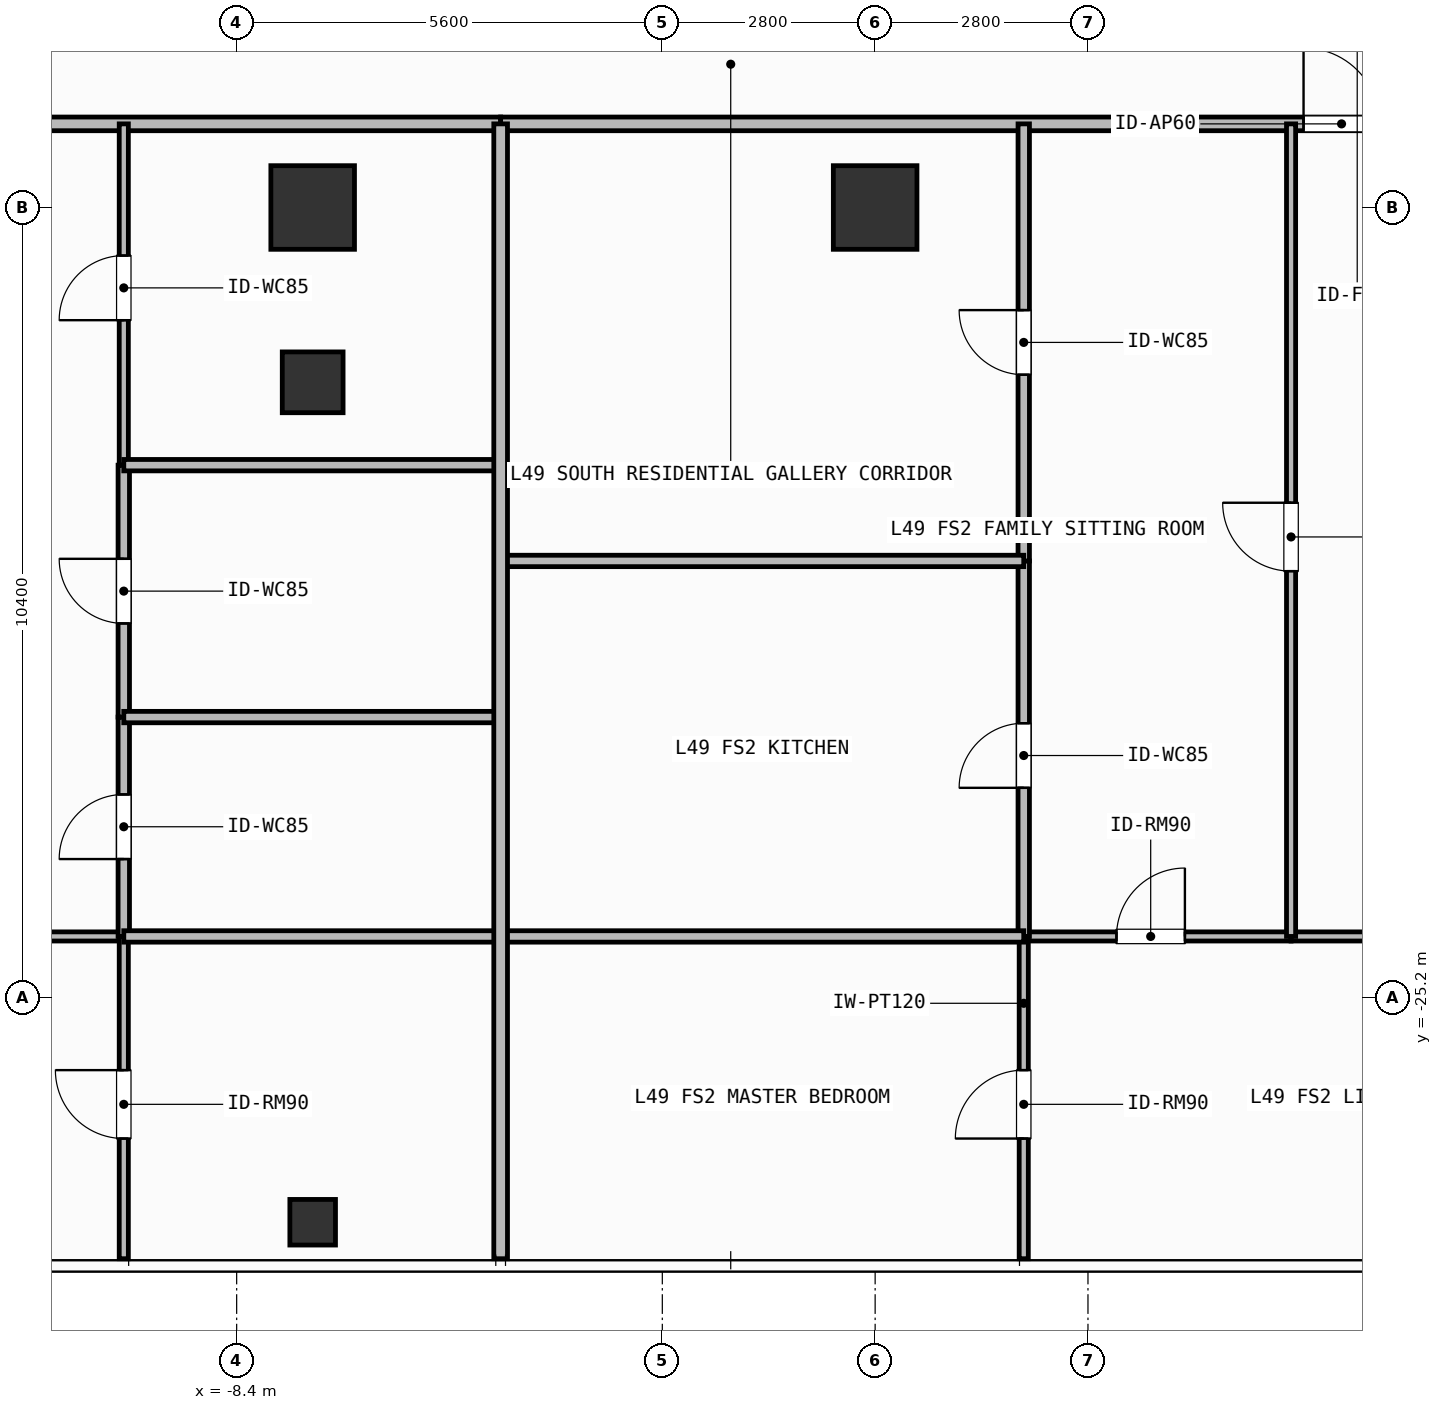
"""IFC4 building model, lengths in metres.
Left out: names, types, materials, properties, quantities, classifications, styles, units other than length and angle.
Written with IfcOpenShell. Run it as: python <this file> out.ifc"""

import sys

from ifc_helpers import new_model, si_unit, direction, frame, frame_2d, origin, origin_2d, place, context, subcontext, project, spatial, rectangle, hollow_rectangle, extrude, element, fill, save


model = new_model("IFC4")
c1 = context("Model", 3, precision=1e-05, world=origin(), true_north=direction((0.0, 1.0)))
c2 = subcontext(c1, "Body", "Model", "MODEL_VIEW")
j1 = project(units=[si_unit("LENGTHUNIT", "METRE"), si_unit("PLANEANGLEUNIT", "RADIAN")], contexts=[c1])
p1 = place(None, origin())
s1 = spatial("IfcSite", under=j1, at=p1, CompositionType="ELEMENT")
p2 = place(p1, origin())
s2 = spatial("IfcBuilding", under=s1, at=p2, CompositionType="ELEMENT")
p3 = place(p2, frame((0.0, 0.0, 199.2)))
s3 = spatial("IfcBuildingStorey", under=s2, at=p3, CompositionType="ELEMENT", Elevation=199.2)
for number, where, z_axis, x_axis in (
    (1, (-7.4, -14.8, 0.0), (0.0, 0.0, 1.0), (1.0, 0.0, 0.0)),
    (2, (0.0, -14.8, 0.0), (0.0, 0.0, 1.0), (1.0, 0.0, 0.0)),
):
    element("IfcColumn", number, at=place(p3, frame(where, z_axis=z_axis, x_axis=x_axis)), inside=s3, PredefinedType="COLUMN", context=c2, shape_type="SweptSolid", body=[
        extrude(rectangle(XDim=1.1, YDim=1.1, at=origin_2d()), origin(), (0.0, 0.0, 1.0), 3.9),
    ])
p4 = place(p3, frame((-7.4, -17.1, 0.0), z_axis=(0.0, 0.0, 1.0), x_axis=(1.0, 0.0, 0.0)))
e3 = element("IfcColumn", 3, at=p4, inside=s3, PredefinedType="COLUMN", context=c2, shape_type="SweptSolid", body=[
    extrude(hollow_rectangle(XDim=0.8, YDim=0.8, WallThickness=0.036, at=origin_2d()), origin(), (0.0, 0.0, 1.0), 3.9),
])
p5 = place(p3, frame((-7.4, -28.15, 0.0), z_axis=(0.0, 0.0, 1.0), x_axis=(1.0, 0.0, 0.0)))
e4 = element("IfcColumn", 4, at=p5, inside=s3, PredefinedType="COLUMN", context=c2, shape_type="SweptSolid", body=[
    extrude(hollow_rectangle(XDim=0.6, YDim=0.6, WallThickness=0.028, at=origin_2d()), origin(), (0.0, 0.0, 1.0), 3.9),
])
p6 = place(p3, frame((-20.82, -13.7, 0.0), z_axis=(0.0, 0.0, 1.0), x_axis=(1.0, 0.0, 0.0)))
e5 = element("IfcWall", 5, at=p6, inside=s3, PredefinedType="PARTITIONING", context=c2, shape_type="SweptSolid", body=[
    extrude(rectangle(XDim=15.893, YDim=0.18, at=frame_2d((7.947, 0.0))), origin(), (0.0, 0.0, 1.0), 3.68),
])
p7 = place(p6, frame((6.997, 0.0, 0.0)))
e6 = element("IfcOpeningElement", 6, at=p7, cuts=e5, PredefinedType="OPENING", context=c2, shape_type="SweptSolid", body=[
    extrude(rectangle(XDim=1.0, YDim=2.2, at=frame_2d((0.5, 1.1))), frame((0.0, 0.1, 0.0), z_axis=(0.0, -1.0, 0.0), x_axis=(1.0, 0.0, 0.0)), (0.0, 0.0, 1.0), 0.2),
])
p8 = place(p3, frame((-16.774, -24.39, 0.0), z_axis=(0.0, 0.0, 1.0), x_axis=(1.0, 0.0, 0.0)))
e7 = element("IfcWall", 7, at=p8, inside=s3, PredefinedType="PARTITIONING", context=c2, shape_type="SweptSolid", body=[
    extrude(rectangle(XDim=6.889, YDim=0.12, at=frame_2d((3.444, 0.0))), origin(), (0.0, 0.0, 1.0), 3.68),
])
p9 = place(p8, frame((2.994, 0.0, 0.0)))
e8 = element("IfcOpeningElement", 8, at=p9, cuts=e7, PredefinedType="OPENING", context=c2, shape_type="SweptSolid", body=[
    extrude(rectangle(XDim=0.9, YDim=2.1, at=frame_2d((0.45, 1.05))), frame((0.0, 0.07, 0.0), z_axis=(0.0, -1.0, 0.0), x_axis=(1.0, 0.0, 0.0)), (0.0, 0.0, 1.0), 0.14),
])
p10 = place(p3, frame((-9.885, -24.39, 0.0), z_axis=(0.0, 0.0, 1.0), x_axis=(0.0, 1.0, 0.0)))
e9 = element("IfcWall", 9, at=p10, inside=s3, PredefinedType="PARTITIONING", context=c2, shape_type="SweptSolid", body=[
    extrude(rectangle(XDim=2.886, YDim=0.15, at=frame_2d((1.443, 0.0))), origin(), (0.0, 0.0, 1.0), 3.68),
])
p11 = place(p10, frame((1.018, 0.0, 0.0)))
e10 = element("IfcOpeningElement", 10, at=p11, cuts=e9, PredefinedType="OPENING", context=c2, shape_type="SweptSolid", body=[
    extrude(rectangle(XDim=0.85, YDim=2.1, at=frame_2d((0.425, 1.05))), frame((0.0, 0.085, 0.0), z_axis=(0.0, -1.0, 0.0), x_axis=(1.0, 0.0, 0.0)), (0.0, 0.0, 1.0), 0.17),
])
p12 = place(p3, frame((-9.885, -21.504, 0.0), z_axis=(0.0, 0.0, 1.0), x_axis=(0.0, 1.0, 0.0)))
e11 = element("IfcWall", 11, at=p12, inside=s3, PredefinedType="PARTITIONING", context=c2, shape_type="SweptSolid", body=[
    extrude(rectangle(XDim=3.314, YDim=0.15, at=frame_2d((1.657, 0.0))), origin(), (0.0, 0.0, 1.0), 3.68),
])
p13 = place(p12, frame((1.232, 0.0, 0.0)))
e12 = element("IfcOpeningElement", 12, at=p13, cuts=e11, PredefinedType="OPENING", context=c2, shape_type="SweptSolid", body=[
    extrude(rectangle(XDim=0.85, YDim=2.1, at=frame_2d((0.425, 1.05))), frame((0.0, 0.085, 0.0), z_axis=(0.0, -1.0, 0.0), x_axis=(1.0, 0.0, 0.0)), (0.0, 0.0, 1.0), 0.17),
])
p14 = place(p3, frame((-9.885, -18.19, 0.0), z_axis=(0.0, 0.0, 1.0), x_axis=(0.0, 1.0, 0.0)))
e13 = element("IfcWall", 13, at=p14, inside=s3, PredefinedType="PARTITIONING", context=c2, shape_type="SweptSolid", body=[
    extrude(rectangle(XDim=4.49, YDim=0.12, at=frame_2d((2.245, 0.0))), origin(), (0.0, 0.0, 1.0), 3.68),
])
p15 = place(p14, frame((1.907, 0.0, 0.0)))
e14 = element("IfcOpeningElement", 14, at=p15, cuts=e13, PredefinedType="OPENING", context=c2, shape_type="SweptSolid", body=[
    extrude(rectangle(XDim=0.85, YDim=2.1, at=frame_2d((0.425, 1.05))), frame((0.0, 0.07, 0.0), z_axis=(0.0, -1.0, 0.0), x_axis=(1.0, 0.0, 0.0)), (0.0, 0.0, 1.0), 0.14),
])
p16 = place(p3, frame((-9.885, -28.63, 0.0), z_axis=(0.0, 0.0, 1.0), x_axis=(0.0, 1.0, 0.0)))
e15 = element("IfcWall", 15, at=p16, inside=s3, PredefinedType="PARTITIONING", context=c2, shape_type="SweptSolid", body=[
    extrude(rectangle(XDim=4.24, YDim=0.12, at=frame_2d((2.12, 0.0))), origin(), (0.0, 0.0, 1.0), 3.68),
])
p17 = place(p16, frame((1.581, 0.0, 0.0)))
e16 = element("IfcOpeningElement", 16, at=p17, cuts=e15, PredefinedType="OPENING", context=c2, shape_type="SweptSolid", body=[
    extrude(rectangle(XDim=0.9, YDim=2.1, at=frame_2d((0.45, 1.05))), frame((0.0, 0.07, 0.0), z_axis=(0.0, -1.0, 0.0), x_axis=(1.0, 0.0, 0.0)), (0.0, 0.0, 1.0), 0.14),
])
p18 = place(p3, frame((-4.927, -13.7, 0.0), z_axis=(0.0, 0.0, 1.0), x_axis=(1.0, 0.0, 0.0)))
e17 = element("IfcWall", 17, at=p18, inside=s3, PredefinedType="PARTITIONING", context=c2, shape_type="SweptSolid", body=[
    extrude(rectangle(XDim=21.947, YDim=0.18, at=frame_2d((10.974, 0.0))), origin(), (0.0, 0.0, 1.0), 3.68),
])
p19 = place(p18, frame((10.563, 0.0, 0.0)))
e18 = element("IfcOpeningElement", 18, at=p19, cuts=e17, PredefinedType="OPENING", context=c2, shape_type="SweptSolid", body=[
    extrude(rectangle(XDim=1.0, YDim=2.2, at=frame_2d((0.5, 1.1))), frame((0.0, 0.1, 0.0), z_axis=(0.0, -1.0, 0.0), x_axis=(1.0, 0.0, 0.0)), (0.0, 0.0, 1.0), 0.2),
])
p20 = place(p3, frame((1.955, -24.39, 0.0), z_axis=(0.0, 0.0, 1.0), x_axis=(1.0, 0.0, 0.0)))
e19 = element("IfcWall", 19, at=p20, inside=s3, PredefinedType="PARTITIONING", context=c2, shape_type="SweptSolid", body=[
    extrude(rectangle(XDim=3.517, YDim=0.12, at=frame_2d((1.758, 0.0))), origin(), (0.0, 0.0, 1.0), 3.68),
])
p21 = place(p20, frame((1.22, 0.0, 0.0)))
e20 = element("IfcOpeningElement", 20, at=p21, cuts=e19, PredefinedType="OPENING", context=c2, shape_type="SweptSolid", body=[
    extrude(rectangle(XDim=0.9, YDim=2.1, at=frame_2d((0.45, 1.05))), frame((0.0, 0.07, 0.0), z_axis=(0.0, -1.0, 0.0), x_axis=(1.0, 0.0, 0.0)), (0.0, 0.0, 1.0), 0.14),
])
p22 = place(p3, frame((5.472, -24.39, 0.0), z_axis=(0.0, 0.0, 1.0), x_axis=(1.0, 0.0, 0.0)))
e21 = element("IfcWall", 21, at=p22, inside=s3, PredefinedType="PARTITIONING", context=c2, shape_type="SweptSolid", body=[
    extrude(rectangle(XDim=5.342, YDim=0.12, at=frame_2d((2.671, 0.0))), origin(), (0.0, 0.0, 1.0), 3.68),
])
p23 = place(p22, frame((2.131, 0.0, 0.0)))
e22 = element("IfcOpeningElement", 22, at=p23, cuts=e21, PredefinedType="OPENING", context=c2, shape_type="SweptSolid", body=[
    extrude(rectangle(XDim=0.9, YDim=2.1, at=frame_2d((0.45, 1.05))), frame((0.0, 0.07, 0.0), z_axis=(0.0, -1.0, 0.0), x_axis=(1.0, 0.0, 0.0)), (0.0, 0.0, 1.0), 0.14),
])
p24 = place(p3, frame((5.472, -24.39, 0.0), z_axis=(0.0, 0.0, 1.0), x_axis=(0.0, 1.0, 0.0)))
e23 = element("IfcWall", 23, at=p24, inside=s3, PredefinedType="PARTITIONING", context=c2, shape_type="SweptSolid", body=[
    extrude(rectangle(XDim=10.69, YDim=0.12, at=frame_2d((5.345, 0.0))), origin(), (0.0, 0.0, 1.0), 3.68),
])
p25 = place(p24, frame((4.806, 0.0, 0.0)))
e24 = element("IfcOpeningElement", 24, at=p25, cuts=e23, PredefinedType="OPENING", context=c2, shape_type="SweptSolid", body=[
    extrude(rectangle(XDim=0.9, YDim=2.1, at=frame_2d((0.45, 1.05))), frame((0.0, 0.07, 0.0), z_axis=(0.0, -1.0, 0.0), x_axis=(1.0, 0.0, 0.0)), (0.0, 0.0, 1.0), 0.14),
])
p26 = place(p3, frame((1.955, -24.39, 0.0), z_axis=(0.0, 0.0, 1.0), x_axis=(0.0, 1.0, 0.0)))
e25 = element("IfcWall", 25, at=p26, inside=s3, PredefinedType="PARTITIONING", context=c2, shape_type="SweptSolid", body=[
    extrude(rectangle(XDim=4.94, YDim=0.15, at=frame_2d((2.47, 0.0))), origin(), (0.0, 0.0, 1.0), 3.68),
])
p27 = place(p26, frame((1.955, 0.0, 0.0)))
e26 = element("IfcOpeningElement", 26, at=p27, cuts=e25, PredefinedType="OPENING", context=c2, shape_type="SweptSolid", body=[
    extrude(rectangle(XDim=0.85, YDim=2.1, at=frame_2d((0.425, 1.05))), frame((0.0, 0.085, 0.0), z_axis=(0.0, -1.0, 0.0), x_axis=(1.0, 0.0, 0.0)), (0.0, 0.0, 1.0), 0.17),
])
p28 = place(p3, frame((1.955, -19.45, 0.0), z_axis=(0.0, 0.0, 1.0), x_axis=(0.0, 1.0, 0.0)))
e27 = element("IfcWall", 27, at=p28, inside=s3, PredefinedType="PARTITIONING", context=c2, shape_type="SweptSolid", body=[
    extrude(rectangle(XDim=5.75, YDim=0.15, at=frame_2d((2.875, 0.0))), origin(), (0.0, 0.0, 1.0), 3.68),
])
p29 = place(p28, frame((2.45, 0.0, 0.0)))
e28 = element("IfcOpeningElement", 28, at=p29, cuts=e27, PredefinedType="OPENING", context=c2, shape_type="SweptSolid", body=[
    extrude(rectangle(XDim=0.85, YDim=2.1, at=frame_2d((0.425, 1.05))), frame((0.0, 0.085, 0.0), z_axis=(0.0, -1.0, 0.0), x_axis=(1.0, 0.0, 0.0)), (0.0, 0.0, 1.0), 0.17),
])
p30 = place(p3, frame((1.955, -28.63, 0.0), z_axis=(0.0, 0.0, 1.0), x_axis=(0.0, 1.0, 0.0)))
e29 = element("IfcWall", 29, at=p30, inside=s3, PredefinedType="PARTITIONING", context=c2, shape_type="SweptSolid", body=[
    extrude(rectangle(XDim=4.24, YDim=0.12, at=frame_2d((2.12, 0.0))), origin(), (0.0, 0.0, 1.0), 3.68),
])
p31 = place(p30, frame((1.581, 0.0, 0.0)))
e30 = element("IfcOpeningElement", 30, at=p31, cuts=e29, PredefinedType="OPENING", context=c2, shape_type="SweptSolid", body=[
    extrude(rectangle(XDim=0.9, YDim=2.1, at=frame_2d((0.45, 1.05))), frame((0.0, 0.07, 0.0), z_axis=(0.0, -1.0, 0.0), x_axis=(1.0, 0.0, 0.0)), (0.0, 0.0, 1.0), 0.14),
])
for number, where, z_axis, x_axis in (
    (31, (-9.885, -21.504, 0.0), (0.0, 0.0, 1.0), (1.0, 0.0, 0.0)),
    (32, (-9.885, -18.19, 0.0), (0.0, 0.0, 1.0), (1.0, 0.0, 0.0)),
    (33, (-9.885, -24.39, 0.0), (0.0, 0.0, 1.0), (1.0, 0.0, 0.0)),
):
    element("IfcWall", number, at=place(p3, frame(where, z_axis=z_axis, x_axis=x_axis)), inside=s3, PredefinedType="PARTITIONING", context=c2, shape_type="SweptSolid", body=[
        extrude(rectangle(XDim=4.958, YDim=0.15, at=frame_2d((2.479, 0.0))), origin(), (0.0, 0.0, 1.0), 3.68),
    ])
for number, where, z_axis, x_axis in (
    (34, (-4.927, -19.45, 0.0), (0.0, 0.0, 1.0), (1.0, 0.0, 0.0)),
    (35, (-4.927, -24.39, 0.0), (0.0, 0.0, 1.0), (1.0, 0.0, 0.0)),
):
    element("IfcWall", number, at=place(p3, frame(where, z_axis=z_axis, x_axis=x_axis)), inside=s3, PredefinedType="PARTITIONING", context=c2, shape_type="SweptSolid", body=[
        extrude(rectangle(XDim=6.882, YDim=0.15, at=frame_2d((3.441, 0.0))), origin(), (0.0, 0.0, 1.0), 3.68),
    ])
p32 = place(p3, frame((-4.927, -28.63, 0.0), z_axis=(0.0, 0.0, 1.0), x_axis=(0.0, 1.0, 0.0)))
e36 = element("IfcWall", 36, at=p32, inside=s3, PredefinedType="PARTITIONING", context=c2, shape_type="SweptSolid", body=[
    extrude(rectangle(XDim=14.93, YDim=0.18, at=frame_2d((7.465, 0.0))), origin(), (0.0, 0.0, 1.0), 3.68),
])
p33 = place(p11, origin())
e37 = element("IfcDoor", 37, at=p33, inside=s3, OperationType="SINGLE_SWING_LEFT", PredefinedType="DOOR", context=c2, shape_type="SweptSolid", body=[
    extrude(rectangle(XDim=0.85, YDim=2.1, at=frame_2d((0.425, 1.05))), frame((0.0, 0.025, 0.0), z_axis=(0.0, -1.0, 0.0), x_axis=(1.0, 0.0, 0.0)), (0.0, 0.0, 1.0), 0.05),
])
fill(e10, e37)
p34 = place(p13, origin())
e38 = element("IfcDoor", 38, at=p34, inside=s3, OperationType="SINGLE_SWING_RIGHT", PredefinedType="DOOR", context=c2, shape_type="SweptSolid", body=[
    extrude(rectangle(XDim=0.85, YDim=2.1, at=frame_2d((0.425, 1.05))), frame((0.0, 0.025, 0.0), z_axis=(0.0, -1.0, 0.0), x_axis=(1.0, 0.0, 0.0)), (0.0, 0.0, 1.0), 0.05),
])
fill(e12, e38)
p35 = place(p15, origin())
e39 = element("IfcDoor", 39, at=p35, inside=s3, OperationType="SINGLE_SWING_LEFT", PredefinedType="DOOR", context=c2, shape_type="SweptSolid", body=[
    extrude(rectangle(XDim=0.85, YDim=2.1, at=frame_2d((0.425, 1.05))), frame((0.0, 0.025, 0.0), z_axis=(0.0, -1.0, 0.0), x_axis=(1.0, 0.0, 0.0)), (0.0, 0.0, 1.0), 0.05),
])
fill(e14, e39)
p36 = place(p17, origin())
e40 = element("IfcDoor", 40, at=p36, inside=s3, OperationType="SINGLE_SWING_RIGHT", PredefinedType="DOOR", context=c2, shape_type="SweptSolid", body=[
    extrude(rectangle(XDim=0.9, YDim=2.1, at=frame_2d((0.45, 1.05))), frame((0.0, 0.025, 0.0), z_axis=(0.0, -1.0, 0.0), x_axis=(1.0, 0.0, 0.0)), (0.0, 0.0, 1.0), 0.05),
])
fill(e16, e40)
p37 = place(p19, origin())
e41 = element("IfcDoor", 41, at=p37, inside=s3, OperationType="SINGLE_SWING_LEFT", PredefinedType="DOOR", context=c2, shape_type="SweptSolid", body=[
    extrude(rectangle(XDim=1.0, YDim=2.2, at=frame_2d((0.5, 1.1))), frame((0.0, 0.025, 0.0), z_axis=(0.0, -1.0, 0.0), x_axis=(1.0, 0.0, 0.0)), (0.0, 0.0, 1.0), 0.05),
])
fill(e18, e41)
p38 = place(p21, origin())
e42 = element("IfcDoor", 42, at=p38, inside=s3, OperationType="SINGLE_SWING_RIGHT", PredefinedType="DOOR", context=c2, shape_type="SweptSolid", body=[
    extrude(rectangle(XDim=0.9, YDim=2.1, at=frame_2d((0.45, 1.05))), frame((0.0, 0.025, 0.0), z_axis=(0.0, -1.0, 0.0), x_axis=(1.0, 0.0, 0.0)), (0.0, 0.0, 1.0), 0.05),
])
fill(e20, e42)
p39 = place(p25, origin())
e43 = element("IfcDoor", 43, at=p39, inside=s3, OperationType="SINGLE_SWING_RIGHT", PredefinedType="DOOR", context=c2, shape_type="SweptSolid", body=[
    extrude(rectangle(XDim=0.9, YDim=2.1, at=frame_2d((0.45, 1.05))), frame((0.0, 0.025, 0.0), z_axis=(0.0, -1.0, 0.0), x_axis=(1.0, 0.0, 0.0)), (0.0, 0.0, 1.0), 0.05),
])
fill(e24, e43)
p40 = place(p27, origin())
e44 = element("IfcDoor", 44, at=p40, inside=s3, OperationType="SINGLE_SWING_LEFT", PredefinedType="DOOR", context=c2, shape_type="SweptSolid", body=[
    extrude(rectangle(XDim=0.85, YDim=2.1, at=frame_2d((0.425, 1.05))), frame((0.0, 0.025, 0.0), z_axis=(0.0, -1.0, 0.0), x_axis=(1.0, 0.0, 0.0)), (0.0, 0.0, 1.0), 0.05),
])
fill(e26, e44)
p41 = place(p29, origin())
e45 = element("IfcDoor", 45, at=p41, inside=s3, OperationType="SINGLE_SWING_RIGHT", PredefinedType="DOOR", context=c2, shape_type="SweptSolid", body=[
    extrude(rectangle(XDim=0.85, YDim=2.1, at=frame_2d((0.425, 1.05))), frame((0.0, 0.025, 0.0), z_axis=(0.0, -1.0, 0.0), x_axis=(1.0, 0.0, 0.0)), (0.0, 0.0, 1.0), 0.05),
])
fill(e28, e45)
p42 = place(p31, origin())
e46 = element("IfcDoor", 46, at=p42, inside=s3, OperationType="SINGLE_SWING_LEFT", PredefinedType="DOOR", context=c2, shape_type="SweptSolid", body=[
    extrude(rectangle(XDim=0.9, YDim=2.1, at=frame_2d((0.45, 1.05))), frame((0.0, 0.025, 0.0), z_axis=(0.0, -1.0, 0.0), x_axis=(1.0, 0.0, 0.0)), (0.0, 0.0, 1.0), 0.05),
])
fill(e30, e46)
save(model, sys.argv[1])
